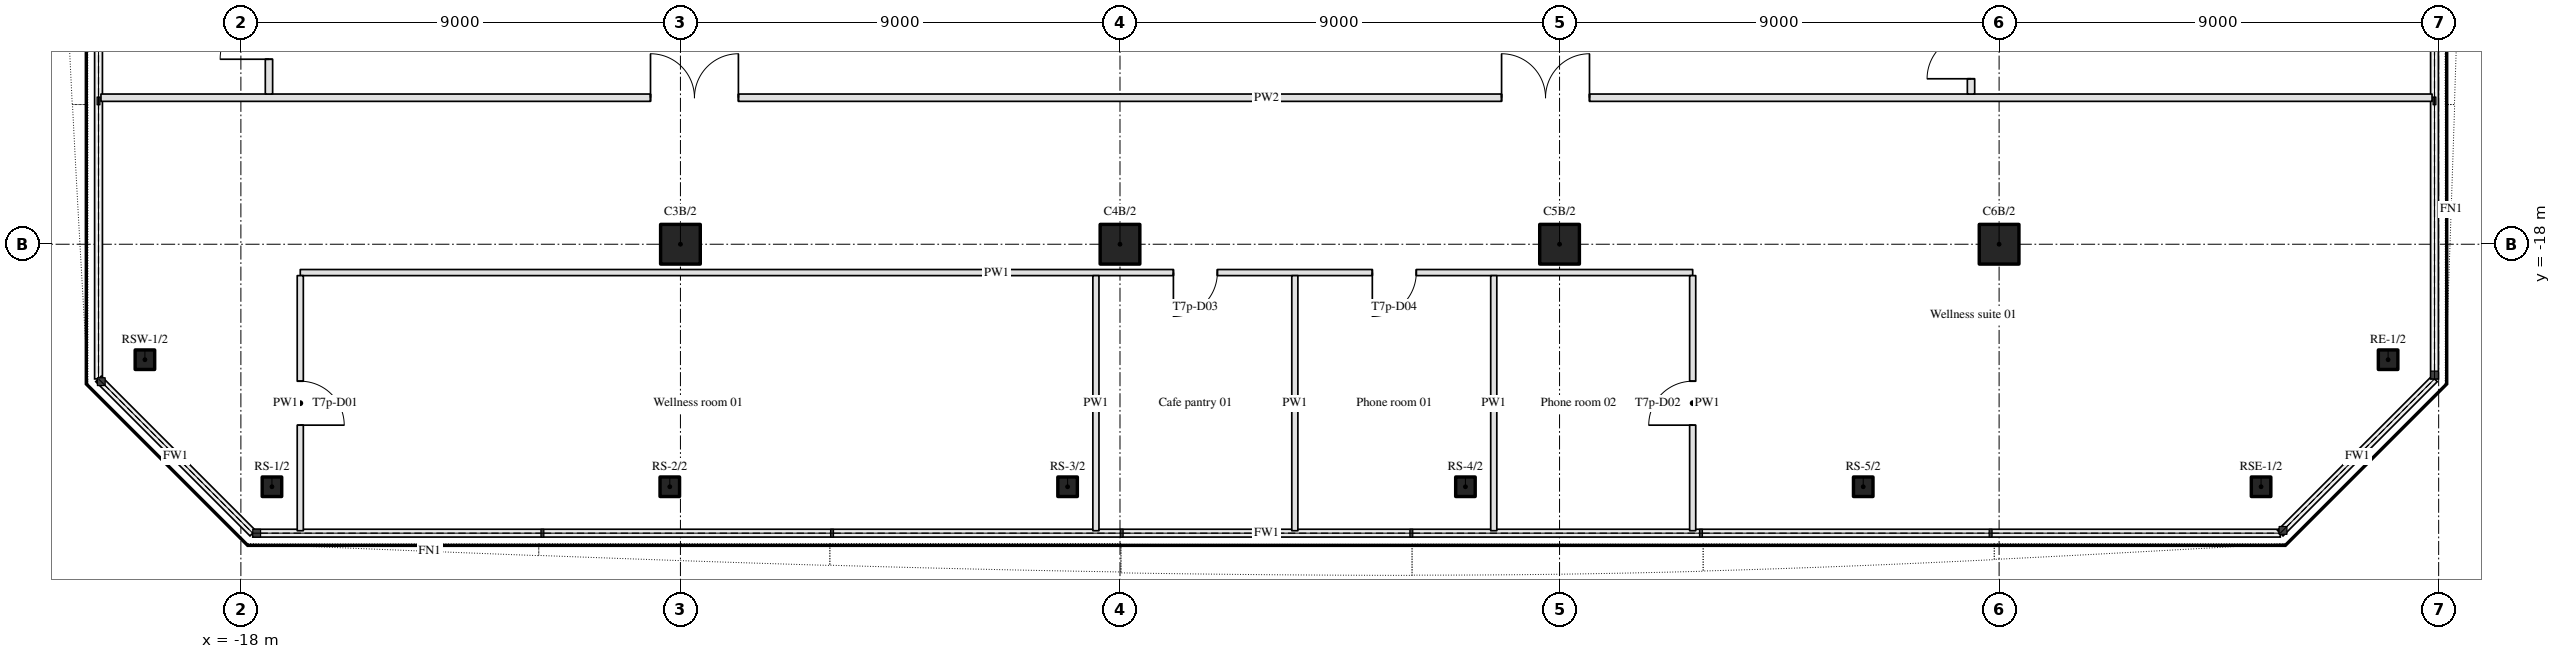
"""IFC4 building model, lengths in metres.
Left out: names, types, materials, properties, quantities, classifications, styles, units other than length and angle.
Written with IfcOpenShell. Run it as: python <this file> out.ifc"""

import sys

from ifc_helpers import new_model, si_unit, direction, frame, frame_2d, origin, origin_2d, place, context, subcontext, project, spatial, rectangle, hollow_rectangle, hollow_circle, extrude, element, fill, save


model = new_model("IFC4")
c1 = context("Model", 3, precision=1e-05, world=origin(), true_north=direction((0.0, 1.0)))
c2 = subcontext(c1, "Body", "Model", "MODEL_VIEW")
j1 = project(units=[si_unit("LENGTHUNIT", "METRE"), si_unit("PLANEANGLEUNIT", "RADIAN")], contexts=[c1])
p1 = place(None, origin())
s1 = spatial("IfcSite", under=j1, at=p1, CompositionType="ELEMENT")
p2 = place(p1, origin())
s2 = spatial("IfcBuilding", under=s1, at=p2, CompositionType="ELEMENT")
p3 = place(p2, frame((0.0, 0.0, 105.0)))
s3 = spatial("IfcBuildingStorey", under=s2, at=p3, CompositionType="ELEMENT", Elevation=105.0)
for number, where, z_axis, x_axis in (
    (1, (-9.0, -18.0, 0.0), (0.0, 0.0, 1.0), (1.0, 0.0, 0.0)),
    (2, (0.0, -18.0, 0.0), (0.0, 0.0, 1.0), (1.0, 0.0, 0.0)),
    (3, (9.0, -18.0, 0.0), (0.0, 0.0, 1.0), (1.0, 0.0, 0.0)),
    (4, (18.0, -18.0, 0.0), (0.0, 0.0, 1.0), (1.0, 0.0, 0.0)),
):
    element("IfcColumn", number, at=place(p3, frame(where, z_axis=z_axis, x_axis=x_axis)), inside=s3, PredefinedType="COLUMN", context=c2, shape_type="SweptSolid", body=[
        extrude(hollow_circle(Radius=0.406, WallThickness=0.036, at=origin_2d()), origin(), (0.0, 0.0, 1.0), 3.9),
    ])
for number, where, z_axis, x_axis in (
    (5, (-17.364, -22.965, 0.0), (0.0, 0.0, 1.0), (1.0, 0.0, 0.0)),
    (6, (-9.218, -22.965, 0.0), (0.0, 0.0, 1.0), (1.0, 0.0, 0.0)),
    (7, (-1.073, -22.965, 0.0), (0.0, 0.0, 1.0), (1.0, 0.0, 0.0)),
    (8, (7.073, -22.965, 0.0), (0.0, 0.0, 1.0), (1.0, 0.0, 0.0)),
    (9, (15.218, -22.965, 0.0), (0.0, 0.0, 1.0), (1.0, 0.0, 0.0)),
    (10, (23.364, -22.965, 0.0), (0.0, 0.0, 1.0), (1.0, 0.0, 0.0)),
    (11, (25.965, -20.364, 0.0), (0.0, 0.0, 1.0), (1.0, 0.0, 0.0)),
    (12, (-19.965, -20.364, 0.0), (0.0, 0.0, 1.0), (1.0, 0.0, 0.0)),
):
    element("IfcColumn", number, at=place(p3, frame(where, z_axis=z_axis, x_axis=x_axis)), inside=s3, PredefinedType="COLUMN", context=c2, shape_type="SweptSolid", body=[
        extrude(hollow_rectangle(XDim=0.4, YDim=0.4, WallThickness=0.025, InnerFilletRadius=0.038, OuterFilletRadius=0.062, at=origin_2d()), origin(), (0.0, 0.0, 1.0), 3.9),
    ])
p4 = place(p3, frame((11.726, -18.58, 0.0), z_axis=(0.0, 0.0, 1.0), x_axis=(-1.0, 0.0, 0.0)))
e13 = element("IfcWall", 13, at=p4, inside=s3, PredefinedType="PARTITIONING", context=c2, shape_type="SweptSolid", body=[
    extrude(rectangle(XDim=28.51, YDim=0.125, at=frame_2d((14.255, 0.0))), origin(), (0.0, 0.0, 1.0), 2.96),
])
p5 = place(p4, frame((9.732, 0.0, 0.0)))
e14 = element("IfcOpeningElement", 14, at=p5, cuts=e13, PredefinedType="OPENING", context=c2, shape_type="SweptSolid", body=[
    extrude(rectangle(XDim=0.9, YDim=2.1, at=frame_2d((0.45, 1.05))), frame((0.0, 0.073, 0.0), z_axis=(0.0, -1.0, 0.0), x_axis=(1.0, 0.0, 0.0)), (0.0, 0.0, 1.0), 0.145),
])
p6 = place(p4, frame((5.659, 0.0, 0.0)))
e15 = element("IfcOpeningElement", 15, at=p6, cuts=e13, PredefinedType="OPENING", context=c2, shape_type="SweptSolid", body=[
    extrude(rectangle(XDim=0.9, YDim=2.1, at=frame_2d((0.45, 1.05))), frame((0.0, 0.073, 0.0), z_axis=(0.0, -1.0, 0.0), x_axis=(1.0, 0.0, 0.0)), (0.0, 0.0, 1.0), 0.145),
])
p7 = place(p3, frame((-20.865, -15.0, 0.0), z_axis=(0.0, 0.0, 1.0), x_axis=(1.0, 0.0, 0.0)))
e16 = element("IfcWall", 16, at=p7, inside=s3, PredefinedType="PARTITIONING", context=c2, shape_type="SweptSolid", body=[
    extrude(rectangle(XDim=47.73, YDim=0.15, at=frame_2d((23.865, 0.0))), origin(), (0.0, 0.0, 1.0), 2.96),
])
p8 = place(p7, frame((11.252, 0.0, 0.0)))
e17 = element("IfcOpeningElement", 17, at=p8, cuts=e16, PredefinedType="OPENING", context=c2, shape_type="SweptSolid", body=[
    extrude(rectangle(XDim=1.8, YDim=2.1, at=frame_2d((0.9, 1.05))), frame((0.0, 0.085, 0.0), z_axis=(0.0, -1.0, 0.0), x_axis=(1.0, 0.0, 0.0)), (0.0, 0.0, 1.0), 0.17),
])
p9 = place(p7, frame((28.678, 0.0, 0.0)))
e18 = element("IfcOpeningElement", 18, at=p9, cuts=e16, PredefinedType="OPENING", context=c2, shape_type="SweptSolid", body=[
    extrude(rectangle(XDim=1.8, YDim=2.1, at=frame_2d((0.9, 1.05))), frame((0.0, 0.085, 0.0), z_axis=(0.0, -1.0, 0.0), x_axis=(1.0, 0.0, 0.0)), (0.0, 0.0, 1.0), 0.17),
])
p10 = place(p3, frame((-17.425, -14.925, 0.0), z_axis=(0.0, 0.0, 1.0), x_axis=(0.0, 1.0, 0.0)))
e19 = element("IfcWall", 19, at=p10, inside=s3, PredefinedType="PARTITIONING", context=c2, shape_type="SweptSolid", body=[
    extrude(rectangle(XDim=26.405, YDim=0.15, at=frame_2d((13.203, 0.0))), origin(), (0.0, 0.0, 1.0), 2.96),
])
p11 = place(p10, frame((0.712, 0.0, 0.0)))
e20 = element("IfcOpeningElement", 20, at=p11, cuts=e19, PredefinedType="OPENING", context=c2, shape_type="SweptSolid", body=[
    extrude(rectangle(XDim=1.0, YDim=2.1, at=frame_2d((0.5, 1.05))), frame((0.0, 0.085, 0.0), z_axis=(0.0, -1.0, 0.0), x_axis=(1.0, 0.0, 0.0)), (0.0, 0.0, 1.0), 0.17),
])
p12 = place(p10, frame((14.168, 0.0, 0.0)))
e21 = element("IfcOpeningElement", 21, at=p12, cuts=e19, PredefinedType="OPENING", context=c2, shape_type="SweptSolid", body=[
    extrude(rectangle(XDim=1.0, YDim=2.1, at=frame_2d((0.5, 1.05))), frame((0.0, 0.085, 0.0), z_axis=(0.0, -1.0, 0.0), x_axis=(1.0, 0.0, 0.0)), (0.0, 0.0, 1.0), 0.17),
])
p13 = place(p10, frame((21.052, 0.0, 0.0)))
e22 = element("IfcOpeningElement", 22, at=p13, cuts=e19, PredefinedType="OPENING", context=c2, shape_type="SweptSolid", body=[
    extrude(rectangle(XDim=1.0, YDim=2.1, at=frame_2d((0.5, 1.05))), frame((0.0, 0.085, 0.0), z_axis=(0.0, -1.0, 0.0), x_axis=(1.0, 0.0, 0.0)), (0.0, 0.0, 1.0), 0.17),
])
p14 = place(p3, frame((-16.784, -18.643, 0.0), z_axis=(0.0, 0.0, 1.0), x_axis=(0.0, -1.0, 0.0)))
e23 = element("IfcWall", 23, at=p14, inside=s3, PredefinedType="PARTITIONING", context=c2, shape_type="SweptSolid", body=[
    extrude(rectangle(XDim=5.222, YDim=0.125, at=frame_2d((2.611, 0.0))), origin(), (0.0, 0.0, 1.0), 2.96),
])
p15 = place(p14, frame((2.161, 0.0, 0.0)))
e24 = element("IfcOpeningElement", 24, at=p15, cuts=e23, PredefinedType="OPENING", context=c2, shape_type="SweptSolid", body=[
    extrude(rectangle(XDim=0.9, YDim=2.1, at=frame_2d((0.45, 1.05))), frame((0.0, 0.073, 0.0), z_axis=(0.0, -1.0, 0.0), x_axis=(1.0, 0.0, 0.0)), (0.0, 0.0, 1.0), 0.145),
])
for number, where, z_axis, x_axis in (
    (25, (-0.493, -23.865, 0.0), (0.0, 0.0, 1.0), (0.0, 1.0, 0.0)),
    (26, (3.58, -23.865, 0.0), (0.0, 0.0, 1.0), (0.0, 1.0, 0.0)),
    (27, (7.653, -23.865, 0.0), (0.0, 0.0, 1.0), (0.0, 1.0, 0.0)),
):
    element("IfcWall", number, at=place(p3, frame(where, z_axis=z_axis, x_axis=x_axis)), inside=s3, PredefinedType="PARTITIONING", context=c2, shape_type="SweptSolid", body=[
        extrude(rectangle(XDim=5.222, YDim=0.125, at=frame_2d((2.611, 0.0))), origin(), (0.0, 0.0, 1.0), 2.96),
    ])
p16 = place(p3, frame((11.726, -23.865, 0.0), z_axis=(0.0, 0.0, 1.0), x_axis=(0.0, 1.0, 0.0)))
e28 = element("IfcWall", 28, at=p16, inside=s3, PredefinedType="PARTITIONING", context=c2, shape_type="SweptSolid", body=[
    extrude(rectangle(XDim=5.222, YDim=0.125, at=frame_2d((2.611, 0.0))), origin(), (0.0, 0.0, 1.0), 2.96),
])
p17 = place(p16, frame((2.161, 0.0, 0.0)))
e29 = element("IfcOpeningElement", 29, at=p17, cuts=e28, PredefinedType="OPENING", context=c2, shape_type="SweptSolid", body=[
    extrude(rectangle(XDim=0.9, YDim=2.1, at=frame_2d((0.45, 1.05))), frame((0.0, 0.073, 0.0), z_axis=(0.0, -1.0, 0.0), x_axis=(1.0, 0.0, 0.0)), (0.0, 0.0, 1.0), 0.145),
])
p18 = place(p3, frame((17.425, -14.925, 0.0), z_axis=(0.0, 0.0, 1.0), x_axis=(0.0, 1.0, 0.0)))
e30 = element("IfcWall", 30, at=p18, inside=s3, PredefinedType="PARTITIONING", context=c2, shape_type="SweptSolid", body=[
    extrude(rectangle(XDim=26.405, YDim=0.15, at=frame_2d((13.203, 0.0))), origin(), (0.0, 0.0, 1.0), 2.96),
])
p19 = place(p18, frame((0.312, 0.0, 0.0)))
e31 = element("IfcOpeningElement", 31, at=p19, cuts=e30, PredefinedType="OPENING", context=c2, shape_type="SweptSolid", body=[
    extrude(rectangle(XDim=1.8, YDim=2.1, at=frame_2d((0.9, 1.05))), frame((0.0, 0.085, 0.0), z_axis=(0.0, -1.0, 0.0), x_axis=(1.0, 0.0, 0.0)), (0.0, 0.0, 1.0), 0.17),
])
p20 = place(p18, frame((12.592, 0.0, 0.0)))
e32 = element("IfcOpeningElement", 32, at=p20, cuts=e30, PredefinedType="OPENING", context=c2, shape_type="SweptSolid", body=[
    extrude(rectangle(XDim=1.8, YDim=2.1, at=frame_2d((0.9, 1.05))), frame((0.0, 0.085, 0.0), z_axis=(0.0, -1.0, 0.0), x_axis=(1.0, 0.0, 0.0)), (0.0, 0.0, 1.0), 0.17),
])
p21 = place(p18, frame((21.551, 0.0, 0.0)))
e33 = element("IfcOpeningElement", 33, at=p21, cuts=e30, PredefinedType="OPENING", context=c2, shape_type="SweptSolid", body=[
    extrude(rectangle(XDim=1.8, YDim=2.1, at=frame_2d((0.9, 1.05))), frame((0.0, 0.085, 0.0), z_axis=(0.0, -1.0, 0.0), x_axis=(1.0, 0.0, 0.0)), (0.0, 0.0, 1.0), 0.17),
])
p22 = place(p19, origin())
e34 = element("IfcDoor", 34, at=p22, inside=s3, OperationType="DOUBLE_DOOR_SINGLE_SWING", PredefinedType="DOOR", context=c2, shape_type="SweptSolid", body=[
    extrude(rectangle(XDim=1.8, YDim=2.1, at=frame_2d((0.9, 1.05))), frame((0.0, 0.025, 0.0), z_axis=(0.0, -1.0, 0.0), x_axis=(1.0, 0.0, 0.0)), (0.0, 0.0, 1.0), 0.05),
])
fill(e31, e34)
p23 = place(p8, origin())
e35 = element("IfcDoor", 35, at=p23, inside=s3, OperationType="DOUBLE_DOOR_SINGLE_SWING", PredefinedType="DOOR", context=c2, shape_type="SweptSolid", body=[
    extrude(rectangle(XDim=1.8, YDim=2.1, at=frame_2d((0.9, 1.05))), frame((0.0, 0.025, 0.0), z_axis=(0.0, -1.0, 0.0), x_axis=(1.0, 0.0, 0.0)), (0.0, 0.0, 1.0), 0.05),
])
fill(e17, e35)
p24 = place(p9, origin())
e36 = element("IfcDoor", 36, at=p24, inside=s3, OperationType="DOUBLE_DOOR_SINGLE_SWING", PredefinedType="DOOR", context=c2, shape_type="SweptSolid", body=[
    extrude(rectangle(XDim=1.8, YDim=2.1, at=frame_2d((0.9, 1.05))), frame((0.0, 0.025, 0.0), z_axis=(0.0, -1.0, 0.0), x_axis=(1.0, 0.0, 0.0)), (0.0, 0.0, 1.0), 0.05),
])
fill(e18, e36)
p25 = place(p11, origin())
e37 = element("IfcDoor", 37, at=p25, inside=s3, OperationType="SINGLE_SWING_LEFT", PredefinedType="DOOR", context=c2, shape_type="SweptSolid", body=[
    extrude(rectangle(XDim=1.0, YDim=2.1, at=frame_2d((0.5, 1.05))), frame((0.0, 0.025, 0.0), z_axis=(0.0, -1.0, 0.0), x_axis=(1.0, 0.0, 0.0)), (0.0, 0.0, 1.0), 0.05),
])
fill(e20, e37)
p26 = place(p5, origin())
e38 = element("IfcDoor", 38, at=p26, inside=s3, OperationType="SINGLE_SWING_RIGHT", PredefinedType="DOOR", context=c2, shape_type="SweptSolid", body=[
    extrude(rectangle(XDim=0.9, YDim=2.1, at=frame_2d((0.45, 1.05))), frame((0.0, 0.025, 0.0), z_axis=(0.0, -1.0, 0.0), x_axis=(1.0, 0.0, 0.0)), (0.0, 0.0, 1.0), 0.05),
])
fill(e14, e38)
p27 = place(p6, origin())
e39 = element("IfcDoor", 39, at=p27, inside=s3, OperationType="SINGLE_SWING_RIGHT", PredefinedType="DOOR", context=c2, shape_type="SweptSolid", body=[
    extrude(rectangle(XDim=0.9, YDim=2.1, at=frame_2d((0.45, 1.05))), frame((0.0, 0.025, 0.0), z_axis=(0.0, -1.0, 0.0), x_axis=(1.0, 0.0, 0.0)), (0.0, 0.0, 1.0), 0.05),
])
fill(e15, e39)
p28 = place(p17, origin())
e40 = element("IfcDoor", 40, at=p28, inside=s3, OperationType="SINGLE_SWING_LEFT", PredefinedType="DOOR", context=c2, shape_type="SweptSolid", body=[
    extrude(rectangle(XDim=0.9, YDim=2.1, at=frame_2d((0.45, 1.05))), frame((0.0, 0.025, 0.0), z_axis=(0.0, -1.0, 0.0), x_axis=(1.0, 0.0, 0.0)), (0.0, 0.0, 1.0), 0.05),
])
fill(e29, e40)
p29 = place(p15, origin())
e41 = element("IfcDoor", 41, at=p29, inside=s3, OperationType="SINGLE_SWING_RIGHT", PredefinedType="DOOR", context=c2, shape_type="SweptSolid", body=[
    extrude(rectangle(XDim=0.9, YDim=2.1, at=frame_2d((0.45, 1.05))), frame((0.0, 0.025, 0.0), z_axis=(0.0, -1.0, 0.0), x_axis=(1.0, 0.0, 0.0)), (0.0, 0.0, 1.0), 0.05),
])
fill(e24, e41)
save(model, sys.argv[1])
